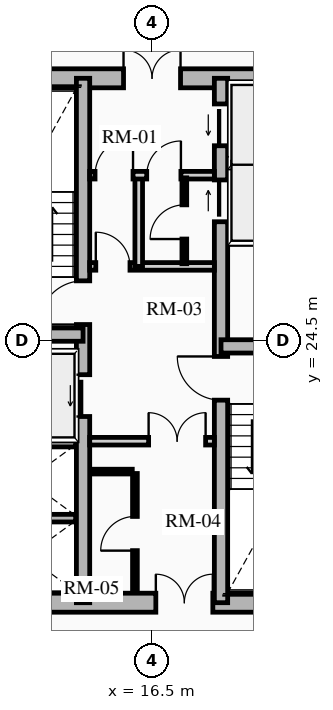
"""IFC4 building model, lengths in metres.
Left out: names, types, materials, properties, quantities, classifications, styles, units other than length and angle.
Written with IfcOpenShell. Run it as: python <this file> out.ifc"""

import sys

from ifc_helpers import new_model, si_unit, direction, frame, frame_2d, origin, place, context, subcontext, project, spatial, rectangle, extrude, source, transform, mapped, element, fill, save


model = new_model("IFC4")
c1 = context("Model", 3, precision=1e-05, world=origin(), true_north=direction((0.0, 1.0)))
c2 = subcontext(c1, "Body", "Model", "MODEL_VIEW")
j1 = project(units=[si_unit("LENGTHUNIT", "METRE"), si_unit("PLANEANGLEUNIT", "RADIAN")], contexts=[c1])
p1 = place(None, origin())
s1 = spatial("IfcSite", under=j1, at=p1, CompositionType="ELEMENT")
p2 = place(p1, origin())
s2 = spatial("IfcBuilding", under=s1, at=p2, CompositionType="ELEMENT")
p3 = place(p2, frame((0.0, 0.0, 48.19)))
s3 = spatial("IfcBuildingStorey", under=s2, at=p3, CompositionType="ELEMENT", Elevation=48.19)
p4 = place(p3, frame((11.15, 17.6, 0.0), z_axis=(0.0, 0.0, 1.0), x_axis=(1.0, 0.0, 0.0)))
e1 = element("IfcWall", 1, at=p4, inside=s3, PredefinedType="SHEAR", context=c2, shape_type="SweptSolid", body=[
    extrude(rectangle(XDim=10.7, YDim=0.5, at=frame_2d((5.35, 0.0))), origin(), (0.0, 0.0, 1.0), 2.91),
])
m1 = source(origin(), c2, "Body", "SweptSolid", [
    extrude(rectangle(XDim=1.5, YDim=2.02, at=frame_2d((0.75, 1.01))), frame((0.0, 0.26, 0.0), z_axis=(0.0, -1.0, 0.0), x_axis=(1.0, 0.0, 0.0)), (0.0, 0.0, 1.0), 0.52),
])
p5 = place(p4, frame((5.45, 0.0, 0.0)))
e2 = element("IfcOpeningElement", 2, at=p5, cuts=e1, PredefinedType="OPENING", context=c2, shape_type="MappedRepresentation", body=[
    mapped(m1, transform((0.0, 0.0, 0.0), x_axis=(1.0, 0.0, 0.0), y_axis=(0.0, 1.0, 0.0), z_axis=(0.0, 0.0, 1.0), scale=1.0)),
])
p6 = place(p3, frame((11.15, 31.4, 0.0), z_axis=(0.0, 0.0, 1.0), x_axis=(1.0, 0.0, 0.0)))
e3 = element("IfcWall", 3, at=p6, inside=s3, PredefinedType="SHEAR", context=c2, shape_type="SweptSolid", body=[
    extrude(rectangle(XDim=10.7, YDim=0.5, at=frame_2d((5.35, 0.0))), origin(), (0.0, 0.0, 1.0), 2.91),
])
p7 = place(p6, frame((4.6, 0.0, 0.0)))
e4 = element("IfcOpeningElement", 4, at=p7, cuts=e3, PredefinedType="OPENING", context=c2, shape_type="MappedRepresentation", body=[
    mapped(m1, transform((0.0, 0.0, 0.0), x_axis=(1.0, 0.0, 0.0), y_axis=(0.0, 1.0, 0.0), z_axis=(0.0, 0.0, 1.0), scale=1.0)),
])
p8 = place(p3, frame((14.685, 17.6, 0.0), z_axis=(0.0, 0.0, 1.0), x_axis=(0.0, 1.0, 0.0)))
e5 = element("IfcWall", 5, at=p8, inside=s3, PredefinedType="SHEAR", context=c2, shape_type="SweptSolid", body=[
    extrude(rectangle(XDim=13.8, YDim=0.35, at=frame_2d((6.9, 0.0))), origin(), (0.0, 0.0, 1.0), 2.91),
])
m2 = source(origin(), c2, "Body", "SweptSolid", [
    extrude(rectangle(XDim=1.1, YDim=2.015, at=frame_2d((0.55, 1.007))), frame((0.0, 0.185, 0.0), z_axis=(0.0, -1.0, 0.0), x_axis=(1.0, 0.0, 0.0)), (0.0, 0.0, 1.0), 0.37),
])
p9 = place(p8, frame((4.9, 0.0, 0.0)))
e6 = element("IfcOpeningElement", 6, at=p9, cuts=e5, PredefinedType="OPENING", context=c2, shape_type="MappedRepresentation", body=[
    mapped(m2, transform((0.0, 0.0, 0.0), x_axis=(1.0, 0.0, 0.0), y_axis=(0.0, 1.0, 0.0), z_axis=(0.0, 0.0, 1.0), scale=1.0)),
])
m3 = source(origin(), c2, "Body", "SweptSolid", [
    extrude(rectangle(XDim=1.15, YDim=2.02, at=frame_2d((0.575, 1.01))), frame((0.0, 0.185, 0.0), z_axis=(0.0, -1.0, 0.0), x_axis=(1.0, 0.0, 0.0)), (0.0, 0.0, 1.0), 0.37),
])
p10 = place(p8, frame((7.32, 0.0, 0.0)))
e7 = element("IfcOpeningElement", 7, at=p10, cuts=e5, PredefinedType="OPENING", context=c2, shape_type="MappedRepresentation", body=[
    mapped(m3, transform((0.0, 0.0, 0.0), x_axis=(1.0, 0.0, 0.0), y_axis=(0.0, 1.0, 0.0), z_axis=(0.0, 0.0, 1.0), scale=1.0)),
])
p11 = place(p3, frame((18.315, 17.6, 0.0), z_axis=(0.0, 0.0, 1.0), x_axis=(0.0, 1.0, 0.0)))
e8 = element("IfcWall", 8, at=p11, inside=s3, PredefinedType="SHEAR", context=c2, shape_type="SweptSolid", body=[
    extrude(rectangle(XDim=13.8, YDim=0.35, at=frame_2d((6.9, 0.0))), origin(), (0.0, 0.0, 1.0), 2.91),
])
p12 = place(p11, frame((10.025, 0.0, 0.0)))
e9 = element("IfcOpeningElement", 9, at=p12, cuts=e8, PredefinedType="OPENING", context=c2, shape_type="MappedRepresentation", body=[
    mapped(m2, transform((0.0, 0.0, 0.0), x_axis=(1.0, 0.0, 0.0), y_axis=(0.0, 1.0, 0.0), z_axis=(0.0, 0.0, 1.0), scale=1.0)),
])
p13 = place(p11, frame((12.025, 0.0, 0.0)))
e10 = element("IfcOpeningElement", 10, at=p13, cuts=e8, PredefinedType="OPENING", context=c2, shape_type="MappedRepresentation", body=[
    mapped(m2, transform((0.0, 0.0, 0.0), x_axis=(1.0, 0.0, 0.0), y_axis=(0.0, 1.0, 0.0), z_axis=(0.0, 0.0, 1.0), scale=1.0)),
])
p14 = place(p11, frame((5.33, 0.0, 0.0)))
e11 = element("IfcOpeningElement", 11, at=p14, cuts=e8, PredefinedType="OPENING", context=c2, shape_type="MappedRepresentation", body=[
    mapped(m3, transform((0.0, 0.0, 0.0), x_axis=(1.0, 0.0, 0.0), y_axis=(0.0, 1.0, 0.0), z_axis=(0.0, 0.0, 1.0), scale=1.0)),
])
for number, where, z_axis, x_axis in (
    (12, (11.4, 24.655, 0.0), (0.0, 0.0, 1.0), (1.0, 0.0, 0.0)),
    (13, (18.315, 24.345, 0.0), (0.0, 0.0, 1.0), (1.0, 0.0, 0.0)),
):
    element("IfcWall", number, at=place(p3, frame(where, z_axis=z_axis, x_axis=x_axis)), inside=s3, PredefinedType="SHEAR", context=c2, shape_type="SweptSolid", body=[
        extrude(rectangle(XDim=3.285, YDim=0.35, at=frame_2d((1.643, 0.0))), origin(), (0.0, 0.0, 1.0), 2.91),
    ])
for number, where, z_axis, x_axis in (
    (14, (11.52, 21.8, 0.0), (0.0, 0.0, 1.0), (1.0, 0.0, 0.0)),
    (15, (11.52, 19.825, 0.0), (0.0, 0.0, 1.0), (1.0, 0.0, 0.0)),
    (16, (18.51, 27.13, 0.0), (0.0, 0.0, 1.0), (1.0, 0.0, 0.0)),
    (17, (18.51, 29.175, 0.0), (0.0, 0.0, 1.0), (1.0, 0.0, 0.0)),
):
    element("IfcWall", number, at=place(p3, frame(where, z_axis=z_axis, x_axis=x_axis)), inside=s3, PredefinedType="SHEAR", context=c2, shape_type="SweptSolid", body=[
        extrude(rectangle(XDim=2.97, YDim=0.2, at=frame_2d((1.485, 0.0))), origin(), (0.0, 0.0, 1.0), 2.91),
    ])
p15 = place(p3, frame((14.86, 21.85, 0.0), z_axis=(0.0, 0.0, 1.0), x_axis=(1.0, 0.0, 0.0)))
e18 = element("IfcWall", 18, at=p15, inside=s3, PredefinedType="PARTITIONING", context=c2, shape_type="SweptSolid", body=[
    extrude(rectangle(XDim=3.28, YDim=0.2, at=frame_2d((1.64, 0.0))), origin(), (0.0, 0.0, 1.0), 2.635),
])
m4 = source(origin(), c2, "Body", "SweptSolid", [
    extrude(rectangle(XDim=1.5, YDim=2.02, at=frame_2d((0.75, 1.01))), frame((0.0, 0.11, 0.0), z_axis=(0.0, -1.0, 0.0), x_axis=(1.0, 0.0, 0.0)), (0.0, 0.0, 1.0), 0.22),
])
p16 = place(p15, frame((1.55, 0.0, 0.0)))
e19 = element("IfcOpeningElement", 19, at=p16, cuts=e18, PredefinedType="OPENING", context=c2, shape_type="MappedRepresentation", body=[
    mapped(m4, transform((0.0, 0.0, 0.0), x_axis=(1.0, 0.0, 0.0), y_axis=(0.0, 1.0, 0.0), z_axis=(0.0, 0.0, 1.0), scale=1.0)),
])
p17 = place(p3, frame((14.86, 26.45, 0.0), z_axis=(0.0, 0.0, 1.0), x_axis=(1.0, 0.0, 0.0)))
e20 = element("IfcWall", 20, at=p17, inside=s3, PredefinedType="PARTITIONING", context=c2, shape_type="SweptSolid", body=[
    extrude(rectangle(XDim=3.28, YDim=0.2, at=frame_2d((1.64, 0.0))), origin(), (0.0, 0.0, 1.0), 2.635),
])
m5 = source(origin(), c2, "Body", "SweptSolid", [
    extrude(rectangle(XDim=0.9, YDim=2.005, at=frame_2d((0.45, 1.002))), frame((0.0, 0.11, 0.0), z_axis=(0.0, -1.0, 0.0), x_axis=(1.0, 0.0, 0.0)), (0.0, 0.0, 1.0), 0.22),
])
p18 = place(p17, frame((0.16, 0.0, 0.0)))
e21 = element("IfcOpeningElement", 21, at=p18, cuts=e20, PredefinedType="OPENING", context=c2, shape_type="MappedRepresentation", body=[
    mapped(m5, transform((0.0, 0.0, 0.0), x_axis=(1.0, 0.0, 0.0), y_axis=(0.0, 1.0, 0.0), z_axis=(0.0, 0.0, 1.0), scale=1.0)),
])
p19 = place(p3, frame((16.15, 26.45, 0.0), z_axis=(0.0, 0.0, 1.0), x_axis=(0.0, 1.0, 0.0)))
e22 = element("IfcWall", 22, at=p19, inside=s3, PredefinedType="PARTITIONING", context=c2, shape_type="SweptSolid", body=[
    extrude(rectangle(XDim=2.4, YDim=0.2, at=frame_2d((1.2, 0.0))), origin(), (0.0, 0.0, 1.0), 2.635),
])
p20 = place(p3, frame((14.86, 28.85, 0.0), z_axis=(0.0, 0.0, 1.0), x_axis=(1.0, 0.0, 0.0)))
e23 = element("IfcWall", 23, at=p20, inside=s3, PredefinedType="PARTITIONING", context=c2, shape_type="SweptSolid", body=[
    extrude(rectangle(XDim=3.28, YDim=0.2, at=frame_2d((1.64, 0.0))), origin(), (0.0, 0.0, 1.0), 2.635),
])
m6 = source(origin(), c2, "Body", "SweptSolid", [
    extrude(rectangle(XDim=1.0, YDim=2.015, at=frame_2d((0.5, 1.007))), frame((0.0, 0.11, 0.0), z_axis=(0.0, -1.0, 0.0), x_axis=(1.0, 0.0, 0.0)), (0.0, 0.0, 1.0), 0.22),
])
p21 = place(p20, frame((0.14, 0.0, 0.0)))
e24 = element("IfcOpeningElement", 24, at=p21, cuts=e23, PredefinedType="OPENING", context=c2, shape_type="MappedRepresentation", body=[
    mapped(m6, transform((0.0, 0.0, 0.0), x_axis=(1.0, 0.0, 0.0), y_axis=(0.0, 1.0, 0.0), z_axis=(0.0, 0.0, 1.0), scale=1.0)),
])
p22 = place(p20, frame((1.5, 0.0, 0.0)))
e25 = element("IfcOpeningElement", 25, at=p22, cuts=e23, PredefinedType="OPENING", context=c2, shape_type="MappedRepresentation", body=[
    mapped(m5, transform((0.0, 0.0, 0.0), x_axis=(1.0, 0.0, 0.0), y_axis=(0.0, 1.0, 0.0), z_axis=(0.0, 0.0, 1.0), scale=1.0)),
])
p23 = place(p3, frame((16.05, 17.92, 0.0), z_axis=(0.0, 0.0, 1.0), x_axis=(0.0, 1.0, 0.0)))
e26 = element("IfcWall", 26, at=p23, inside=s3, PredefinedType="PARTITIONING", context=c2, shape_type="SweptSolid", body=[
    extrude(rectangle(XDim=3.08, YDim=0.125, at=frame_2d((1.54, 0.0))), origin(), (0.0, 0.0, 1.0), 2.635),
])
m7 = source(origin(), c2, "Body", "SweptSolid", [
    extrude(rectangle(XDim=0.9, YDim=2.005, at=frame_2d((0.45, 1.002))), frame((0.0, 0.073, 0.0), z_axis=(0.0, -1.0, 0.0), x_axis=(1.0, 0.0, 0.0)), (0.0, 0.0, 1.0), 0.145),
])
p24 = place(p23, frame((1.05, 0.0, 0.0)))
e27 = element("IfcOpeningElement", 27, at=p24, cuts=e26, PredefinedType="OPENING", context=c2, shape_type="MappedRepresentation", body=[
    mapped(m7, transform((0.0, 0.0, 0.0), x_axis=(1.0, 0.0, 0.0), y_axis=(0.0, 1.0, 0.0), z_axis=(0.0, 0.0, 1.0), scale=1.0)),
])
p25 = place(p3, frame((14.88, 21.05, 0.0), z_axis=(0.0, 0.0, 1.0), x_axis=(1.0, 0.0, 0.0)))
e28 = element("IfcWall", 28, at=p25, inside=s3, PredefinedType="PARTITIONING", context=c2, shape_type="SweptSolid", body=[
    extrude(rectangle(XDim=1.1, YDim=0.125, at=frame_2d((0.55, 0.0))), origin(), (0.0, 0.0, 1.0), 2.635),
])
p26 = place(p3, frame((17.35, 26.52, 0.0), z_axis=(0.0, 0.0, 1.0), x_axis=(0.0, 1.0, 0.0)))
e29 = element("IfcWall", 29, at=p26, inside=s3, PredefinedType="PARTITIONING", context=c2, shape_type="SweptSolid", body=[
    extrude(rectangle(XDim=2.26, YDim=0.125, at=frame_2d((1.13, 0.0))), origin(), (0.0, 0.0, 1.0), 2.635),
])
p27 = place(p26, frame((0.65, 0.0, 0.0)))
e30 = element("IfcOpeningElement", 30, at=p27, cuts=e29, PredefinedType="OPENING", context=c2, shape_type="MappedRepresentation", body=[
    mapped(m7, transform((0.0, 0.0, 0.0), x_axis=(1.0, 0.0, 0.0), y_axis=(0.0, 1.0, 0.0), z_axis=(0.0, 0.0, 1.0), scale=1.0)),
])
m8 = source(origin(), c2, "Body", "SweptSolid", [
    extrude(rectangle(XDim=1.1, YDim=2.015, at=frame_2d((0.55, 1.007))), frame((0.0, 0.025, 0.0), z_axis=(0.0, -1.0, 0.0), x_axis=(1.0, 0.0, 0.0)), (0.0, 0.0, 1.0), 0.05),
])
p28 = place(p9, origin())
e31 = element("IfcDoor", 31, at=p28, inside=s3, OperationType="SLIDING_TO_LEFT", PredefinedType="DOOR", context=c2, shape_type="MappedRepresentation", body=[
    mapped(m8, transform((0.0, 0.0, 0.0), x_axis=(1.0, 0.0, 0.0), y_axis=(0.0, 1.0, 0.0), z_axis=(0.0, 0.0, 1.0), scale=1.0)),
])
fill(e6, e31)
p29 = place(p12, origin())
e32 = element("IfcDoor", 32, at=p29, inside=s3, OperationType="SLIDING_TO_RIGHT", PredefinedType="DOOR", context=c2, shape_type="MappedRepresentation", body=[
    mapped(m8, transform((0.0, 0.0, 0.0), x_axis=(1.0, 0.0, 0.0), y_axis=(0.0, 1.0, 0.0), z_axis=(0.0, 0.0, 1.0), scale=1.0)),
])
fill(e9, e32)
p30 = place(p13, origin())
e33 = element("IfcDoor", 33, at=p30, inside=s3, OperationType="SLIDING_TO_LEFT", PredefinedType="DOOR", context=c2, shape_type="MappedRepresentation", body=[
    mapped(m8, transform((0.0, 0.0, 0.0), x_axis=(1.0, 0.0, 0.0), y_axis=(0.0, 1.0, 0.0), z_axis=(0.0, 0.0, 1.0), scale=1.0)),
])
fill(e10, e33)
m9 = source(origin(), c2, "Body", "SweptSolid", [
    extrude(rectangle(XDim=1.15, YDim=2.02, at=frame_2d((0.575, 1.01))), frame((0.0, 0.025, 0.0), z_axis=(0.0, -1.0, 0.0), x_axis=(1.0, 0.0, 0.0)), (0.0, 0.0, 1.0), 0.05),
])
p31 = place(p10, origin())
e34 = element("IfcDoor", 34, at=p31, inside=s3, OperationType="SINGLE_SWING_LEFT", PredefinedType="DOOR", context=c2, shape_type="MappedRepresentation", body=[
    mapped(m9, transform((0.0, 0.0, 0.0), x_axis=(1.0, 0.0, 0.0), y_axis=(0.0, 1.0, 0.0), z_axis=(0.0, 0.0, 1.0), scale=1.0)),
])
fill(e7, e34)
p32 = place(p14, origin())
e35 = element("IfcDoor", 35, at=p32, inside=s3, OperationType="SINGLE_SWING_RIGHT", PredefinedType="DOOR", context=c2, shape_type="MappedRepresentation", body=[
    mapped(m9, transform((0.0, 0.0, 0.0), x_axis=(1.0, 0.0, 0.0), y_axis=(0.0, 1.0, 0.0), z_axis=(0.0, 0.0, 1.0), scale=1.0)),
])
fill(e11, e35)
m10 = source(origin(), c2, "Body", "SweptSolid", [
    extrude(rectangle(XDim=1.5, YDim=2.02, at=frame_2d((0.75, 1.01))), frame((0.0, 0.025, 0.0), z_axis=(0.0, -1.0, 0.0), x_axis=(1.0, 0.0, 0.0)), (0.0, 0.0, 1.0), 0.05),
])
p33 = place(p7, origin())
e36 = element("IfcDoor", 36, at=p33, inside=s3, OperationType="DOUBLE_DOOR_SINGLE_SWING", PredefinedType="DOOR", context=c2, shape_type="MappedRepresentation", body=[
    mapped(m10, transform((0.0, 0.0, 0.0), x_axis=(1.0, 0.0, 0.0), y_axis=(0.0, 1.0, 0.0), z_axis=(0.0, 0.0, 1.0), scale=1.0)),
])
fill(e4, e36)
p34 = place(p5, origin())
e37 = element("IfcDoor", 37, at=p34, inside=s3, OperationType="DOUBLE_DOOR_SINGLE_SWING", PredefinedType="DOOR", context=c2, shape_type="MappedRepresentation", body=[
    mapped(m10, transform((0.0, 0.0, 0.0), x_axis=(1.0, 0.0, 0.0), y_axis=(0.0, 1.0, 0.0), z_axis=(0.0, 0.0, 1.0), scale=1.0)),
])
fill(e2, e37)
p35 = place(p16, origin())
e38 = element("IfcDoor", 38, at=p35, inside=s3, OperationType="DOUBLE_DOOR_SINGLE_SWING", PredefinedType="DOOR", context=c2, shape_type="MappedRepresentation", body=[
    mapped(m10, transform((0.0, 0.0, 0.0), x_axis=(1.0, 0.0, 0.0), y_axis=(0.0, 1.0, 0.0), z_axis=(0.0, 0.0, 1.0), scale=1.0)),
])
fill(e19, e38)
m11 = source(origin(), c2, "Body", "SweptSolid", [
    extrude(rectangle(XDim=0.9, YDim=2.005, at=frame_2d((0.45, 1.002))), frame((0.0, 0.025, 0.0), z_axis=(0.0, -1.0, 0.0), x_axis=(1.0, 0.0, 0.0)), (0.0, 0.0, 1.0), 0.05),
])
p36 = place(p18, origin())
e39 = element("IfcDoor", 39, at=p36, inside=s3, OperationType="SINGLE_SWING_LEFT", PredefinedType="DOOR", context=c2, shape_type="MappedRepresentation", body=[
    mapped(m11, transform((0.0, 0.0, 0.0), x_axis=(1.0, 0.0, 0.0), y_axis=(0.0, 1.0, 0.0), z_axis=(0.0, 0.0, 1.0), scale=1.0)),
])
fill(e21, e39)
m12 = source(origin(), c2, "Body", "SweptSolid", [
    extrude(rectangle(XDim=1.0, YDim=2.015, at=frame_2d((0.5, 1.007))), frame((0.0, 0.025, 0.0), z_axis=(0.0, -1.0, 0.0), x_axis=(1.0, 0.0, 0.0)), (0.0, 0.0, 1.0), 0.05),
])
p37 = place(p21, origin())
e40 = element("IfcDoor", 40, at=p37, inside=s3, OperationType="SINGLE_SWING_RIGHT", PredefinedType="DOOR", context=c2, shape_type="MappedRepresentation", body=[
    mapped(m12, transform((0.0, 0.0, 0.0), x_axis=(1.0, 0.0, 0.0), y_axis=(0.0, 1.0, 0.0), z_axis=(0.0, 0.0, 1.0), scale=1.0)),
])
fill(e24, e40)
p38 = place(p24, origin())
e41 = element("IfcDoor", 41, at=p38, inside=s3, OperationType="SINGLE_SWING_LEFT", PredefinedType="DOOR", context=c2, shape_type="MappedRepresentation", body=[
    mapped(m11, transform((0.0, 0.0, 0.0), x_axis=(1.0, 0.0, 0.0), y_axis=(0.0, 1.0, 0.0), z_axis=(0.0, 0.0, 1.0), scale=1.0)),
])
fill(e27, e41)
p39 = place(p22, origin())
e42 = element("IfcDoor", 42, at=p39, inside=s3, OperationType="SINGLE_SWING_RIGHT", PredefinedType="DOOR", context=c2, shape_type="MappedRepresentation", body=[
    mapped(m11, transform((0.0, 0.0, 0.0), x_axis=(1.0, 0.0, 0.0), y_axis=(0.0, 1.0, 0.0), z_axis=(0.0, 0.0, 1.0), scale=1.0)),
])
fill(e25, e42)
p40 = place(p27, origin())
e43 = element("IfcDoor", 43, at=p40, inside=s3, OperationType="SINGLE_SWING_LEFT", PredefinedType="DOOR", context=c2, shape_type="MappedRepresentation", body=[
    mapped(m11, transform((0.0, 0.0, 0.0), x_axis=(1.0, 0.0, 0.0), y_axis=(0.0, 1.0, 0.0), z_axis=(0.0, 0.0, 1.0), scale=1.0)),
])
fill(e30, e43)
save(model, sys.argv[1])
